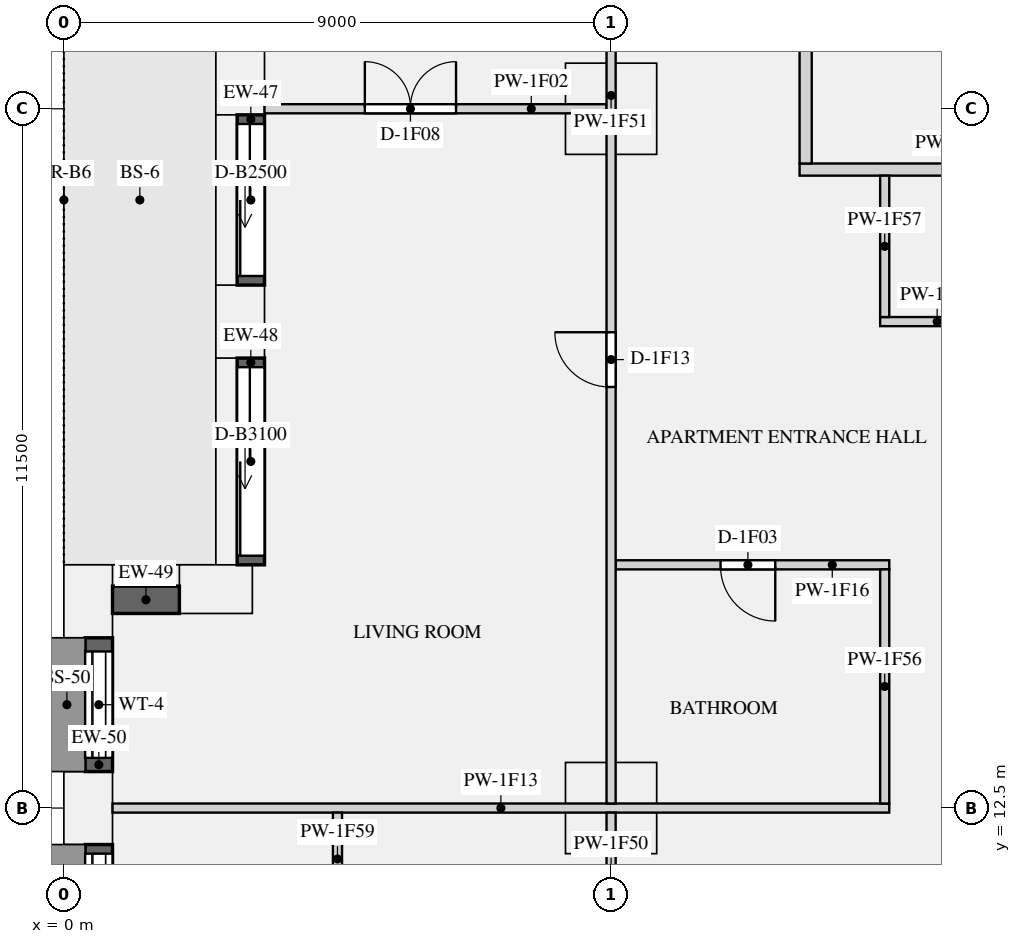
"""IFC4 building model, lengths in metres.
Left out: names, types, materials, properties, quantities, classifications, styles, units other than length and angle.
Written with IfcOpenShell. Run it as: python <this file> out.ifc"""

import sys

from ifc_helpers import new_model, si_unit, direction, frame, frame_2d, origin, origin_2d, place, context, subcontext, project, spatial, rectangle, extrude, element, fill, save


model = new_model("IFC4")
c1 = context("Model", 3, precision=1e-05, world=origin(), true_north=direction((0.0, 1.0)))
c2 = subcontext(c1, "Body", "Model", "MODEL_VIEW")
j1 = project(units=[si_unit("LENGTHUNIT", "METRE"), si_unit("PLANEANGLEUNIT", "RADIAN")], contexts=[c1])
p1 = place(None, origin())
s1 = spatial("IfcSite", under=j1, at=p1, CompositionType="ELEMENT")
p2 = place(p1, origin())
s2 = spatial("IfcBuilding", under=s1, at=p2, CompositionType="ELEMENT")
p3 = place(p2, frame((0.0, 0.0, 60.45)))
s3 = spatial("IfcBuildingStorey", under=s2, at=p3, CompositionType="ELEMENT", Elevation=60.45)
for number, where, z_axis, x_axis in (
    (1, (2.9, 24.5, 0.0), (0.0, 0.0, 1.0), (0.0, -1.0, 0.0)),
    (2, (2.9, 20.5, 0.0), (0.0, 0.0, 1.0), (0.0, -1.0, 0.0)),
    (3, (2.5, 16.1, 0.0), (0.0, 0.0, 1.0), (-1.0, 0.0, 0.0)),
    (4, (0.4, 15.9, 0.0), (0.0, 0.0, 1.0), (0.0, -1.0, 0.0)),
    (5, (0.4, 12.5, 0.0), (0.0, 0.0, 1.0), (0.0, -1.0, 0.0)),
):
    element("IfcColumn", number, at=place(p3, frame(where, z_axis=z_axis, x_axis=x_axis)), inside=s3, PredefinedType="USERDEFINED", context=c2, shape_type="SweptSolid", body=[
        extrude(rectangle(XDim=1.2, YDim=0.8, at=origin_2d()), origin(), (0.0, 0.0, 1.0), 3.15),
    ])
for number, where, z_axis, x_axis in (
    (6, (9.0, 24.0, 0.0), (0.0, 0.0, 1.0), (1.0, 0.0, 0.0)),
    (7, (9.0, 12.5, 0.0), (0.0, 0.0, 1.0), (1.0, 0.0, 0.0)),
):
    element("IfcColumn", number, at=place(p3, frame(where, z_axis=z_axis, x_axis=x_axis)), inside=s3, PredefinedType="COLUMN", context=c2, shape_type="SweptSolid", body=[
        extrude(rectangle(XDim=1.5, YDim=1.5, at=origin_2d()), origin(), (0.0, 0.0, 1.0), 3.15),
    ])
p4 = place(p3, frame((3.075, 23.9, 0.0), z_axis=(0.0, 0.0, 1.0), x_axis=(0.0, -1.0, 0.0)))
e8 = element("IfcWall", 8, at=p4, inside=s3, PredefinedType="SOLIDWALL", context=c2, shape_type="SweptSolid", body=[
    extrude(rectangle(XDim=2.8, YDim=0.45, at=frame_2d((1.4, 0.0))), origin(), (0.0, 0.0, 1.0), 2.83),
])
p5 = place(p4, frame((0.15, 0.0, 0.0)))
e9 = element("IfcOpeningElement", 9, at=p5, cuts=e8, PredefinedType="OPENING", context=c2, shape_type="SweptSolid", body=[
    extrude(rectangle(XDim=2.5, YDim=2.3, at=frame_2d((1.25, 1.15))), frame((0.0, 0.235, 0.0), z_axis=(0.0, -1.0, 0.0), x_axis=(1.0, 0.0, 0.0)), (0.0, 0.0, 1.0), 0.47),
])
p6 = place(p3, frame((3.075, 19.9, 0.0), z_axis=(0.0, 0.0, 1.0), x_axis=(0.0, -1.0, 0.0)))
e10 = element("IfcWall", 10, at=p6, inside=s3, PredefinedType="SOLIDWALL", context=c2, shape_type="SweptSolid", body=[
    extrude(rectangle(XDim=3.4, YDim=0.45, at=frame_2d((1.7, 0.0))), origin(), (0.0, 0.0, 1.0), 2.83),
])
p7 = place(p6, frame((0.15, 0.0, 0.0)))
e11 = element("IfcOpeningElement", 11, at=p7, cuts=e10, PredefinedType="OPENING", context=c2, shape_type="SweptSolid", body=[
    extrude(rectangle(XDim=3.1, YDim=2.3, at=frame_2d((1.55, 1.15))), frame((0.0, 0.235, 0.0), z_axis=(0.0, -1.0, 0.0), x_axis=(1.0, 0.0, 0.0)), (0.0, 0.0, 1.0), 0.47),
])
p8 = place(p3, frame((1.9, 15.925, 0.9), z_axis=(0.0, 0.0, 1.0), x_axis=(-1.0, 0.0, 0.0)))
e12 = element("IfcWall", 12, at=p8, inside=s3, PredefinedType="SOLIDWALL", context=c2, shape_type="SweptSolid", body=[
    extrude(rectangle(XDim=1.1, YDim=0.45, at=frame_2d((0.55, 0.0))), origin(), (0.0, 0.0, 1.0), 1.93),
])
p9 = place(p3, frame((0.575, 15.3, 0.9), z_axis=(0.0, 0.0, 1.0), x_axis=(0.0, -1.0, 0.0)))
e13 = element("IfcWall", 13, at=p9, inside=s3, PredefinedType="SOLIDWALL", context=c2, shape_type="SweptSolid", body=[
    extrude(rectangle(XDim=2.2, YDim=0.45, at=frame_2d((1.1, 0.0))), origin(), (0.0, 0.0, 1.0), 1.93),
])
p10 = place(p9, frame((0.225, 0.0, 0.15)))
e14 = element("IfcOpeningElement", 14, at=p10, cuts=e13, PredefinedType="OPENING", context=c2, shape_type="SweptSolid", body=[
    extrude(rectangle(XDim=1.75, YDim=1.5, at=frame_2d((0.875, 0.75))), frame((0.0, 0.235, 0.0), z_axis=(0.0, -1.0, 0.0), x_axis=(1.0, 0.0, 0.0)), (0.0, 0.0, 1.0), 0.47),
])
p11 = place(p3, frame((0.575, 11.9, 0.9), z_axis=(0.0, 0.0, 1.0), x_axis=(0.0, -1.0, 0.0)))
e15 = element("IfcWall", 15, at=p11, inside=s3, PredefinedType="SOLIDWALL", context=c2, shape_type="SweptSolid", body=[
    extrude(rectangle(XDim=2.8, YDim=0.45, at=frame_2d((1.4, 0.0))), origin(), (0.0, 0.0, 1.0), 1.93),
])
p12 = place(p11, frame((0.15, 0.0, 0.15)))
e16 = element("IfcOpeningElement", 16, at=p12, cuts=e15, PredefinedType="OPENING", context=c2, shape_type="SweptSolid", body=[
    extrude(rectangle(XDim=2.5, YDim=1.5, at=frame_2d((1.25, 0.75))), frame((0.0, 0.235, 0.0), z_axis=(0.0, -1.0, 0.0), x_axis=(1.0, 0.0, 0.0)), (0.0, 0.0, 1.0), 0.47),
])
p13 = place(p3, frame((12.1, 23.0, 0.0), z_axis=(0.0, 0.0, 1.0), x_axis=(1.0, 0.0, 0.0)))
e17 = element("IfcWall", 17, at=p13, inside=s3, PredefinedType="PARTITIONING", context=c2, shape_type="SweptSolid", body=[
    extrude(rectangle(XDim=5.0, YDim=0.2, at=frame_2d((2.5, 0.0))), origin(), (0.0, 0.0, 1.0), 2.83),
])
p14 = place(p3, frame((12.2, 23.1, 0.0), z_axis=(0.0, 0.0, 1.0), x_axis=(0.0, 1.0, 0.0)))
e18 = element("IfcWall", 18, at=p14, inside=s3, PredefinedType="PARTITIONING", context=c2, shape_type="SweptSolid", body=[
    extrude(rectangle(XDim=3.9, YDim=0.2, at=frame_2d((1.95, 0.0))), origin(), (0.0, 0.0, 1.0), 2.83),
])
p15 = place(p3, frame((3.3, 24.0, 0.0), z_axis=(0.0, 0.0, 1.0), x_axis=(1.0, 0.0, 0.0)))
e19 = element("IfcWall", 19, at=p15, inside=s3, PredefinedType="PARTITIONING", context=c2, shape_type="SweptSolid", body=[
    extrude(rectangle(XDim=5.625, YDim=0.15, at=frame_2d((2.812, 0.0))), origin(), (0.0, 0.0, 1.0), 2.83),
])
p16 = place(p15, frame((1.65, 0.0, 0.0)))
e20 = element("IfcOpeningElement", 20, at=p16, cuts=e19, PredefinedType="OPENING", context=c2, shape_type="SweptSolid", body=[
    extrude(rectangle(XDim=1.5, YDim=2.1, at=frame_2d((0.75, 1.05))), frame((0.0, 0.085, 0.0), z_axis=(0.0, -1.0, 0.0), x_axis=(1.0, 0.0, 0.0)), (0.0, 0.0, 1.0), 0.17),
])
p17 = place(p3, frame((0.8, 12.5, 0.0), z_axis=(0.0, 0.0, 1.0), x_axis=(1.0, 0.0, 0.0)))
e21 = element("IfcWall", 21, at=p17, inside=s3, PredefinedType="PARTITIONING", context=c2, shape_type="SweptSolid", body=[
    extrude(rectangle(XDim=12.775, YDim=0.15, at=frame_2d((6.387, 0.0))), origin(), (0.0, 0.0, 1.0), 2.83),
])
p18 = place(p3, frame((13.425, 20.5, 0.0), z_axis=(0.0, 0.0, 1.0), x_axis=(1.0, 0.0, 0.0)))
e22 = element("IfcWall", 22, at=p18, inside=s3, PredefinedType="PARTITIONING", context=c2, shape_type="SweptSolid", body=[
    extrude(rectangle(XDim=4.475, YDim=0.15, at=frame_2d((2.237, 0.0))), origin(), (0.0, 0.0, 1.0), 2.83),
])
p19 = place(p18, frame((1.875, 0.0, 0.0)))
e23 = element("IfcOpeningElement", 23, at=p19, cuts=e22, PredefinedType="OPENING", context=c2, shape_type="SweptSolid", body=[
    extrude(rectangle(XDim=0.9, YDim=2.1, at=frame_2d((0.45, 1.05))), frame((0.0, 0.085, 0.0), z_axis=(0.0, -1.0, 0.0), x_axis=(1.0, 0.0, 0.0)), (0.0, 0.0, 1.0), 0.17),
])
p20 = place(p3, frame((9.075, 16.5, 0.0), z_axis=(0.0, 0.0, 1.0), x_axis=(1.0, 0.0, 0.0)))
e24 = element("IfcWall", 24, at=p20, inside=s3, PredefinedType="PARTITIONING", context=c2, shape_type="SweptSolid", body=[
    extrude(rectangle(XDim=4.5, YDim=0.15, at=frame_2d((2.25, 0.0))), origin(), (0.0, 0.0, 1.0), 2.83),
])
p21 = place(p20, frame((1.725, 0.0, 0.0)))
e25 = element("IfcOpeningElement", 25, at=p21, cuts=e24, PredefinedType="OPENING", context=c2, shape_type="SweptSolid", body=[
    extrude(rectangle(XDim=0.9, YDim=2.1, at=frame_2d((0.45, 1.05))), frame((0.0, 0.085, 0.0), z_axis=(0.0, -1.0, 0.0), x_axis=(1.0, 0.0, 0.0)), (0.0, 0.0, 1.0), 0.17),
])
p22 = place(p3, frame((9.0, 8.575, 0.0), z_axis=(0.0, 0.0, 1.0), x_axis=(0.0, 1.0, 0.0)))
e26 = element("IfcWall", 26, at=p22, inside=s3, PredefinedType="PARTITIONING", context=c2, shape_type="SweptSolid", body=[
    extrude(rectangle(XDim=3.85, YDim=0.15, at=frame_2d((1.925, 0.0))), origin(), (0.0, 0.0, 1.0), 2.83),
])
p23 = place(p22, frame((1.15, 0.0, 0.0)))
e27 = element("IfcOpeningElement", 27, at=p23, cuts=e26, PredefinedType="OPENING", context=c2, shape_type="SweptSolid", body=[
    extrude(rectangle(XDim=0.8, YDim=2.1, at=frame_2d((0.4, 1.05))), frame((0.0, 0.085, 0.0), z_axis=(0.0, -1.0, 0.0), x_axis=(1.0, 0.0, 0.0)), (0.0, 0.0, 1.0), 0.17),
])
p24 = place(p3, frame((9.0, 12.575, 0.0), z_axis=(0.0, 0.0, 1.0), x_axis=(0.0, 1.0, 0.0)))
e28 = element("IfcWall", 28, at=p24, inside=s3, PredefinedType="PARTITIONING", context=c2, shape_type="SweptSolid", body=[
    extrude(rectangle(XDim=19.725, YDim=0.15, at=frame_2d((9.863, 0.0))), origin(), (0.0, 0.0, 1.0), 2.83),
])
p25 = place(p24, frame((15.537, 0.0, 0.0)))
e29 = element("IfcOpeningElement", 29, at=p25, cuts=e28, PredefinedType="OPENING", context=c2, shape_type="SweptSolid", body=[
    extrude(rectangle(XDim=0.9, YDim=2.1, at=frame_2d((0.45, 1.05))), frame((0.0, 0.085, 0.0), z_axis=(0.0, -1.0, 0.0), x_axis=(1.0, 0.0, 0.0)), (0.0, 0.0, 1.0), 0.17),
])
p26 = place(p24, frame((6.85, 0.0, 0.0)))
e30 = element("IfcOpeningElement", 30, at=p26, cuts=e28, PredefinedType="OPENING", context=c2, shape_type="SweptSolid", body=[
    extrude(rectangle(XDim=0.9, YDim=2.1, at=frame_2d((0.45, 1.05))), frame((0.0, 0.085, 0.0), z_axis=(0.0, -1.0, 0.0), x_axis=(1.0, 0.0, 0.0)), (0.0, 0.0, 1.0), 0.17),
])
p27 = place(p3, frame((13.5, 12.575, 0.0), z_axis=(0.0, 0.0, 1.0), x_axis=(0.0, 1.0, 0.0)))
e31 = element("IfcWall", 31, at=p27, inside=s3, PredefinedType="PARTITIONING", context=c2, shape_type="SweptSolid", body=[
    extrude(rectangle(XDim=3.85, YDim=0.15, at=frame_2d((1.925, 0.0))), origin(), (0.0, 0.0, 1.0), 2.83),
])
p28 = place(p3, frame((13.5, 20.575, 0.0), z_axis=(0.0, 0.0, 1.0), x_axis=(0.0, 1.0, 0.0)))
e32 = element("IfcWall", 32, at=p28, inside=s3, PredefinedType="PARTITIONING", context=c2, shape_type="SweptSolid", body=[
    extrude(rectangle(XDim=2.325, YDim=0.15, at=frame_2d((1.163, 0.0))), origin(), (0.0, 0.0, 1.0), 2.83),
])
p29 = place(p3, frame((4.5, 8.575, 0.0), z_axis=(0.0, 0.0, 1.0), x_axis=(0.0, 1.0, 0.0)))
e33 = element("IfcWall", 33, at=p29, inside=s3, PredefinedType="PARTITIONING", context=c2, shape_type="SweptSolid", body=[
    extrude(rectangle(XDim=3.85, YDim=0.15, at=frame_2d((1.925, 0.0))), origin(), (0.0, 0.0, 1.0), 2.83),
])
p30 = place(p29, frame((1.525, 0.0, 0.0)))
e34 = element("IfcOpeningElement", 34, at=p30, cuts=e33, PredefinedType="OPENING", context=c2, shape_type="SweptSolid", body=[
    extrude(rectangle(XDim=0.8, YDim=2.1, at=frame_2d((0.4, 1.05))), frame((0.0, 0.085, 0.0), z_axis=(0.0, -1.0, 0.0), x_axis=(1.0, 0.0, 0.0)), (0.0, 0.0, 1.0), 0.17),
])
p31 = place(p5, origin())
e35 = element("IfcDoor", 35, at=p31, inside=s3, OperationType="SLIDING_TO_LEFT", PredefinedType="DOOR", context=c2, shape_type="SweptSolid", body=[
    extrude(rectangle(XDim=2.5, YDim=2.3, at=frame_2d((1.25, 1.15))), frame((0.0, -0.07, 0.0), z_axis=(0.0, -1.0, 0.0), x_axis=(1.0, 0.0, 0.0)), (0.0, 0.0, 1.0), 0.05),
])
fill(e9, e35)
p32 = place(p7, origin())
e36 = element("IfcDoor", 36, at=p32, inside=s3, OperationType="SLIDING_TO_LEFT", PredefinedType="DOOR", context=c2, shape_type="SweptSolid", body=[
    extrude(rectangle(XDim=3.1, YDim=2.3, at=frame_2d((1.55, 1.15))), frame((0.0, -0.07, 0.0), z_axis=(0.0, -1.0, 0.0), x_axis=(1.0, 0.0, 0.0)), (0.0, 0.0, 1.0), 0.05),
])
fill(e11, e36)
p33 = place(p10, origin())
e37 = element("IfcWindow", 37, at=p33, inside=s3, PartitioningType="SINGLE_PANEL", PredefinedType="WINDOW", context=c2, shape_type="SweptSolid", body=[
    extrude(rectangle(XDim=1.75, YDim=1.5, at=frame_2d((0.875, 0.75))), frame((0.0, -0.065, 0.0), z_axis=(0.0, -1.0, 0.0), x_axis=(1.0, 0.0, 0.0)), (0.0, 0.0, 1.0), 0.06),
])
fill(e14, e37)
p34 = place(p12, origin())
e38 = element("IfcWindow", 38, at=p34, inside=s3, PartitioningType="SINGLE_PANEL", PredefinedType="WINDOW", context=c2, shape_type="SweptSolid", body=[
    extrude(rectangle(XDim=2.5, YDim=1.5, at=frame_2d((1.25, 0.75))), frame((0.0, -0.065, 0.0), z_axis=(0.0, -1.0, 0.0), x_axis=(1.0, 0.0, 0.0)), (0.0, 0.0, 1.0), 0.06),
])
fill(e16, e38)
p35 = place(p21, frame((0.9, 0.0, 0.0), z_axis=(0.0, 0.0, 1.0), x_axis=(-1.0, 0.0, 0.0)))
e39 = element("IfcDoor", 39, at=p35, inside=s3, OperationType="SINGLE_SWING_LEFT", PredefinedType="DOOR", context=c2, shape_type="SweptSolid", body=[
    extrude(rectangle(XDim=0.9, YDim=2.1, at=frame_2d((0.45, 1.05))), frame((0.0, 0.025, 0.0), z_axis=(0.0, -1.0, 0.0), x_axis=(1.0, 0.0, 0.0)), (0.0, 0.0, 1.0), 0.05),
])
fill(e25, e39)
p36 = place(p16, origin())
e40 = element("IfcDoor", 40, at=p36, inside=s3, OperationType="DOUBLE_DOOR_SINGLE_SWING", PredefinedType="DOOR", context=c2, shape_type="SweptSolid", body=[
    extrude(rectangle(XDim=1.5, YDim=2.1, at=frame_2d((0.75, 1.05))), frame((0.0, 0.025, 0.0), z_axis=(0.0, -1.0, 0.0), x_axis=(1.0, 0.0, 0.0)), (0.0, 0.0, 1.0), 0.05),
])
fill(e20, e40)
p37 = place(p26, origin())
e41 = element("IfcDoor", 41, at=p37, inside=s3, OperationType="SINGLE_SWING_RIGHT", PredefinedType="DOOR", context=c2, shape_type="SweptSolid", body=[
    extrude(rectangle(XDim=0.9, YDim=2.1, at=frame_2d((0.45, 1.05))), frame((0.0, 0.025, 0.0), z_axis=(0.0, -1.0, 0.0), x_axis=(1.0, 0.0, 0.0)), (0.0, 0.0, 1.0), 0.05),
])
fill(e30, e41)
save(model, sys.argv[1])
